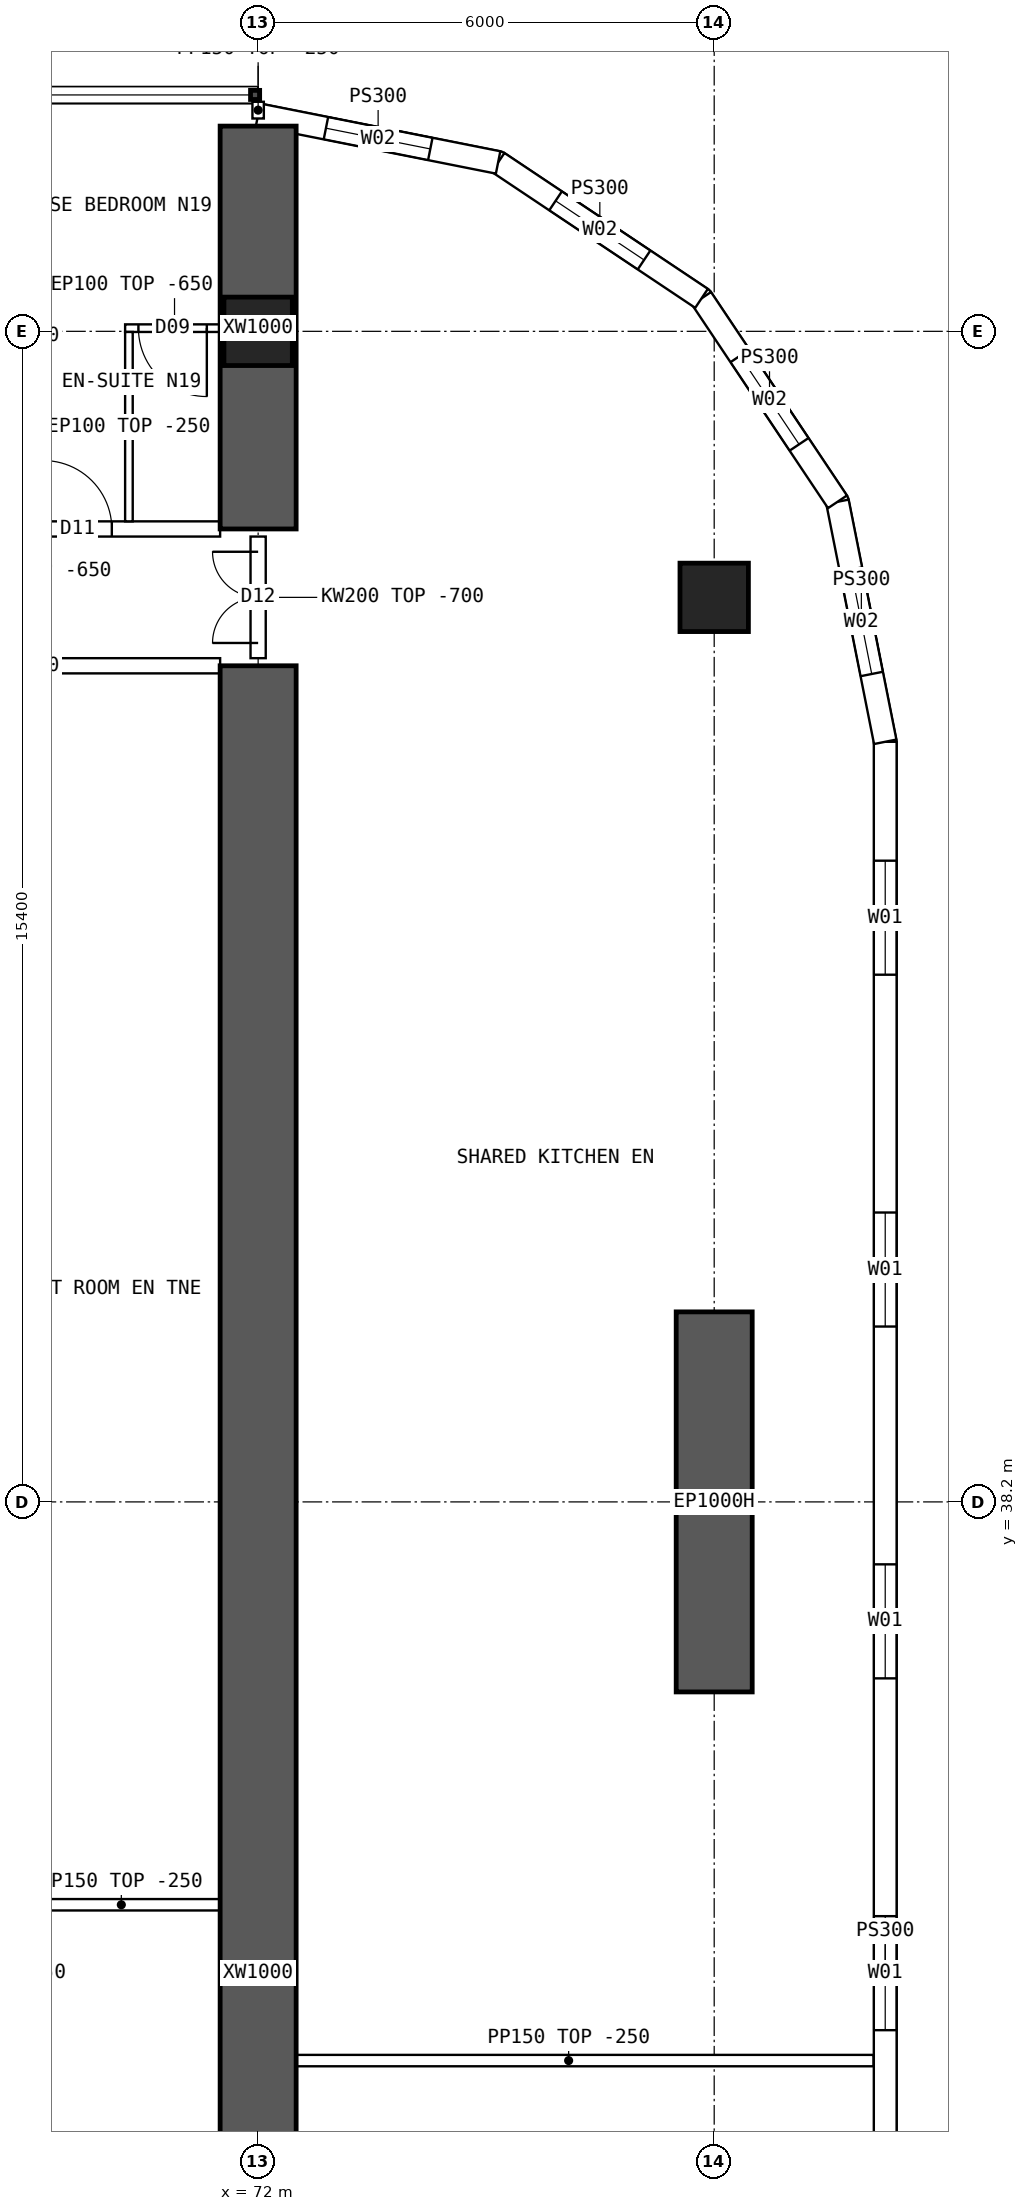
"""IFC4 building model, lengths in metres.
Left out: names, types, materials, properties, quantities, classifications, styles, units other than length and angle.
Written with IfcOpenShell. Run it as: python <this file> out.ifc"""

import sys

from ifc_helpers import new_model, si_unit, direction, frame, frame_2d, origin, origin_2d, place, context, subcontext, project, spatial, polyline, rectangle, hollow_rectangle, outline, extrude, element, fill, save


model = new_model("IFC4")
c1 = context("Model", 3, precision=1e-05, world=origin(), true_north=direction((0.0, 1.0)))
c2 = subcontext(c1, "Body", "Model", "MODEL_VIEW")
j1 = project(units=[si_unit("LENGTHUNIT", "METRE"), si_unit("PLANEANGLEUNIT", "RADIAN")], contexts=[c1])
p1 = place(None, origin())
s1 = spatial("IfcSite", under=j1, at=p1, CompositionType="ELEMENT")
p2 = place(p1, origin())
s2 = spatial("IfcBuilding", under=s1, at=p2, CompositionType="ELEMENT")
p3 = place(p2, frame((0.0, 0.0, 61.45)))
s3 = spatial("IfcBuildingStorey", under=s2, at=p3, CompositionType="ELEMENT", Elevation=61.45)
for number, where, z_axis, x_axis in (
    (1, (72.0, 53.6, 0.0), (0.0, 0.0, 1.0), (1.0, 0.0, 0.0)),
    (2, (78.0, 50.1, 0.0), (0.0, 0.0, 1.0), (1.0, 0.0, 0.0)),
):
    element("IfcColumn", number, at=place(p3, frame(where, z_axis=z_axis, x_axis=x_axis)), inside=s3, PredefinedType="COLUMN", context=c2, shape_type="SweptSolid", body=[
        extrude(hollow_rectangle(XDim=0.9, YDim=0.9, WallThickness=0.09, at=origin_2d()), origin(), (0.0, 0.0, 1.0), 3.75),
    ])
p4 = place(p3, frame((78.0, 35.7, 0.0), z_axis=(0.0, 0.0, 1.0), x_axis=(0.0, 1.0, 0.0)))
e3 = element("IfcWall", 3, at=p4, inside=s3, PredefinedType="SHEAR", context=c2, shape_type="SweptSolid", body=[
    extrude(rectangle(XDim=5.0, YDim=1.0, at=frame_2d((2.5, 0.0))), origin(), (0.0, 0.0, 1.0), 3.75),
])
p5 = place(p3, frame((72.0, 51.0, 0.0), z_axis=(0.0, 0.0, 1.0), x_axis=(0.0, 1.0, 0.0)))
e4 = element("IfcWall", 4, at=p5, inside=s3, PredefinedType="SHEAR", context=c2, shape_type="SweptSolid", body=[
    extrude(rectangle(XDim=5.3, YDim=1.0, at=frame_2d((2.65, 0.0))), origin(), (0.0, 0.0, 1.0), 3.75),
])
p6 = place(p3, frame((72.0, 14.8, 0.0), z_axis=(0.0, 0.0, 1.0), x_axis=(0.0, 1.0, 0.0)))
e5 = element("IfcWall", 5, at=p6, inside=s3, PredefinedType="SHEAR", context=c2, shape_type="SweptSolid", body=[
    extrude(rectangle(XDim=34.4, YDim=1.0, at=frame_2d((17.2, 0.0))), origin(), (0.0, 0.0, 1.0), 3.75),
])
p7 = place(p3, frame((80.25, 15.8, 0.0), z_axis=(0.0, 0.0, 1.0), x_axis=(0.0, 1.0, 0.0)))
e6 = element("IfcWall", 6, at=p7, inside=s3, PredefinedType="SOLIDWALL", context=c2, shape_type="SweptSolid", body=[
    extrude(outline(polyline([(-0.015, -0.15), (32.415, -0.15), (32.385, 0.15), (0.015, 0.15), (-0.015, -0.15)])), origin(), (0.0, 0.0, 1.0), 3.5),
])
p8 = place(p7, frame((1.564, 0.0, 0.9)))
e7 = element("IfcOpeningElement", 7, at=p8, cuts=e6, PredefinedType="OPENING", context=c2, shape_type="SweptSolid", body=[
    extrude(rectangle(XDim=1.5, YDim=2.0, at=frame_2d((0.75, 1.0))), frame((0.0, 0.16, 0.0), z_axis=(0.0, -1.0, 0.0), x_axis=(1.0, 0.0, 0.0)), (0.0, 0.0, 1.0), 0.32),
])
p9 = place(p7, frame((6.193, 0.0, 0.9)))
e8 = element("IfcOpeningElement", 8, at=p9, cuts=e6, PredefinedType="OPENING", context=c2, shape_type="SweptSolid", body=[
    extrude(rectangle(XDim=1.5, YDim=2.0, at=frame_2d((0.75, 1.0))), frame((0.0, 0.16, 0.0), z_axis=(0.0, -1.0, 0.0), x_axis=(1.0, 0.0, 0.0)), (0.0, 0.0, 1.0), 0.32),
])
p10 = place(p7, frame((10.822, 0.0, 0.9)))
e9 = element("IfcOpeningElement", 9, at=p10, cuts=e6, PredefinedType="OPENING", context=c2, shape_type="SweptSolid", body=[
    extrude(rectangle(XDim=1.5, YDim=2.0, at=frame_2d((0.75, 1.0))), frame((0.0, 0.16, 0.0), z_axis=(0.0, -1.0, 0.0), x_axis=(1.0, 0.0, 0.0)), (0.0, 0.0, 1.0), 0.32),
])
p11 = place(p7, frame((15.45, 0.0, 0.9)))
e10 = element("IfcOpeningElement", 10, at=p11, cuts=e6, PredefinedType="OPENING", context=c2, shape_type="SweptSolid", body=[
    extrude(rectangle(XDim=1.5, YDim=2.0, at=frame_2d((0.75, 1.0))), frame((0.0, 0.16, 0.0), z_axis=(0.0, -1.0, 0.0), x_axis=(1.0, 0.0, 0.0)), (0.0, 0.0, 1.0), 0.32),
])
p12 = place(p7, frame((20.079, 0.0, 0.9)))
e11 = element("IfcOpeningElement", 11, at=p12, cuts=e6, PredefinedType="OPENING", context=c2, shape_type="SweptSolid", body=[
    extrude(rectangle(XDim=1.5, YDim=2.0, at=frame_2d((0.75, 1.0))), frame((0.0, 0.16, 0.0), z_axis=(0.0, -1.0, 0.0), x_axis=(1.0, 0.0, 0.0)), (0.0, 0.0, 1.0), 0.32),
])
p13 = place(p7, frame((24.707, 0.0, 0.9)))
e12 = element("IfcOpeningElement", 12, at=p13, cuts=e6, PredefinedType="OPENING", context=c2, shape_type="SweptSolid", body=[
    extrude(rectangle(XDim=1.5, YDim=2.0, at=frame_2d((0.75, 1.0))), frame((0.0, 0.16, 0.0), z_axis=(0.0, -1.0, 0.0), x_axis=(1.0, 0.0, 0.0)), (0.0, 0.0, 1.0), 0.32),
])
p14 = place(p7, frame((29.336, 0.0, 0.9)))
e13 = element("IfcOpeningElement", 13, at=p14, cuts=e6, PredefinedType="OPENING", context=c2, shape_type="SweptSolid", body=[
    extrude(rectangle(XDim=1.5, YDim=2.0, at=frame_2d((0.75, 1.0))), frame((0.0, 0.16, 0.0), z_axis=(0.0, -1.0, 0.0), x_axis=(1.0, 0.0, 0.0)), (0.0, 0.0, 1.0), 0.32),
])
p15 = place(p3, frame((80.25, 48.2, 0.0), z_axis=(0.0, 0.0, 1.0), x_axis=(-0.195065901187, 0.980790137692, 0.0)))
e14 = element("IfcWall", 14, at=p15, inside=s3, PredefinedType="SOLIDWALL", context=c2, shape_type="SweptSolid", body=[
    extrude(outline(polyline([(-0.015, -0.15), (3.249, -0.15), (3.189, 0.15), (0.015, 0.15), (-0.015, -0.15)])), origin(), (0.0, 0.0, 1.0), 3.5),
])
p16 = place(p15, frame((0.909, 0.0, 0.9)))
e15 = element("IfcOpeningElement", 15, at=p16, cuts=e14, PredefinedType="OPENING", context=c2, shape_type="SweptSolid", body=[
    extrude(rectangle(XDim=1.4, YDim=1.8, at=frame_2d((0.7, 0.9))), frame((0.0, 0.16, 0.0), z_axis=(0.0, -1.0, 0.0), x_axis=(1.0, 0.0, 0.0)), (0.0, 0.0, 1.0), 0.32),
])
p17 = place(p3, frame((79.622, 51.357, 0.0), z_axis=(0.0, 0.0, 1.0), x_axis=(-0.555609954424, 0.831443069936, 0.0)))
e16 = element("IfcWall", 16, at=p17, inside=s3, PredefinedType="SOLIDWALL", context=c2, shape_type="SweptSolid", body=[
    extrude(outline(polyline([(-0.03, -0.15), (3.249, -0.15), (3.189, 0.15), (0.03, 0.15), (-0.03, -0.15)])), origin(), (0.0, 0.0, 1.0), 3.5),
])
p18 = place(p17, frame((0.909, 0.0, 0.9)))
e17 = element("IfcOpeningElement", 17, at=p18, cuts=e16, PredefinedType="OPENING", context=c2, shape_type="SweptSolid", body=[
    extrude(rectangle(XDim=1.4, YDim=1.8, at=frame_2d((0.7, 0.9))), frame((0.0, 0.16, 0.0), z_axis=(0.0, -1.0, 0.0), x_axis=(1.0, 0.0, 0.0)), (0.0, 0.0, 1.0), 0.32),
])
p19 = place(p3, frame((77.833, 54.034, 0.0), z_axis=(0.0, 0.0, 1.0), x_axis=(-0.831478105043, 0.555557522525, 0.0)))
e18 = element("IfcWall", 18, at=p19, inside=s3, PredefinedType="SOLIDWALL", context=c2, shape_type="SweptSolid", body=[
    extrude(outline(polyline([(-0.03, -0.15), (3.249, -0.15), (3.189, 0.15), (0.03, 0.15), (-0.03, -0.15)])), origin(), (0.0, 0.0, 1.0), 3.5),
])
p20 = place(p19, frame((0.909, 0.0, 0.9)))
e19 = element("IfcOpeningElement", 19, at=p20, cuts=e18, PredefinedType="OPENING", context=c2, shape_type="SweptSolid", body=[
    extrude(rectangle(XDim=1.4, YDim=1.8, at=frame_2d((0.7, 0.9))), frame((0.0, 0.16, 0.0), z_axis=(0.0, -1.0, 0.0), x_axis=(1.0, 0.0, 0.0)), (0.0, 0.0, 1.0), 0.32),
])
p21 = place(p3, frame((75.157, 55.822, 0.0), z_axis=(0.0, 0.0, 1.0), x_axis=(-0.980787251524, 0.195080412259, 0.0)))
e20 = element("IfcWall", 20, at=p21, inside=s3, PredefinedType="SOLIDWALL", context=c2, shape_type="SweptSolid", body=[
    extrude(outline(polyline([(-0.03, -0.15), (3.249, -0.15), (3.189, 0.15), (0.03, 0.15), (-0.03, -0.15)])), origin(), (0.0, 0.0, 1.0), 3.5),
])
p22 = place(p21, frame((0.909, 0.0, 0.9)))
e21 = element("IfcOpeningElement", 21, at=p22, cuts=e20, PredefinedType="OPENING", context=c2, shape_type="SweptSolid", body=[
    extrude(rectangle(XDim=1.4, YDim=1.8, at=frame_2d((0.7, 0.9))), frame((0.0, 0.16, 0.0), z_axis=(0.0, -1.0, 0.0), x_axis=(1.0, 0.0, 0.0)), (0.0, 0.0, 1.0), 0.32),
])
p23 = place(p3, frame((66.5, 51.0, 0.0), z_axis=(0.0, 0.0, 1.0), x_axis=(1.0, 0.0, 0.0)))
e22 = element("IfcWall", 22, at=p23, inside=s3, PredefinedType="SOLIDWALL", context=c2, shape_type="SweptSolid", body=[
    extrude(outline(polyline([(0.0, 0.0), (5.0, 0.0), (5.0, 3.1), (0.0, 3.1), (0.0, 0.0)])), frame((0.0, 0.1, 0.0), z_axis=(0.0, -1.0, 0.0), x_axis=(1.0, 0.0, 0.0)), (0.0, 0.0, 1.0), 0.2),
])
p24 = place(p23, frame((1.3, 0.0, 0.0)))
e23 = element("IfcOpeningElement", 23, at=p24, cuts=e22, PredefinedType="OPENING", context=c2, shape_type="SweptSolid", body=[
    extrude(rectangle(XDim=0.9, YDim=2.1, at=frame_2d((0.45, 1.05))), frame((0.0, 0.11, 0.0), z_axis=(0.0, -1.0, 0.0), x_axis=(1.0, 0.0, 0.0)), (0.0, 0.0, 1.0), 0.22),
])
p25 = place(p23, frame((2.675, 0.0, 0.0)))
e24 = element("IfcOpeningElement", 24, at=p25, cuts=e22, PredefinedType="OPENING", context=c2, shape_type="SweptSolid", body=[
    extrude(rectangle(XDim=0.9, YDim=2.1, at=frame_2d((0.45, 1.05))), frame((0.0, 0.11, 0.0), z_axis=(0.0, -1.0, 0.0), x_axis=(1.0, 0.0, 0.0)), (0.0, 0.0, 1.0), 0.22),
])
p26 = place(p3, frame((66.5, 49.2, 0.0), z_axis=(0.0, 0.0, 1.0), x_axis=(1.0, 0.0, 0.0)))
e25 = element("IfcWall", 25, at=p26, inside=s3, PredefinedType="SOLIDWALL", context=c2, shape_type="SweptSolid", body=[
    extrude(rectangle(XDim=5.0, YDim=0.2, at=frame_2d((2.5, 0.0))), origin(), (0.0, 0.0, 1.0), 3.5),
])
p27 = place(p26, frame((0.2, 0.0, 0.0)))
e26 = element("IfcOpeningElement", 26, at=p27, cuts=e25, PredefinedType="OPENING", context=c2, shape_type="SweptSolid", body=[
    extrude(rectangle(XDim=1.6, YDim=2.1, at=frame_2d((0.8, 1.05))), frame((0.0, 0.11, 0.0), z_axis=(0.0, -1.0, 0.0), x_axis=(1.0, 0.0, 0.0)), (0.0, 0.0, 1.0), 0.22),
])
p28 = place(p3, frame((70.25, 53.642, 0.0), z_axis=(0.0, 0.0, 1.0), x_axis=(1.0, 0.0, 0.0)))
e27 = element("IfcWall", 27, at=p28, inside=s3, PredefinedType="PARTITIONING", context=c2, shape_type="SweptSolid", body=[
    extrude(outline(polyline([(0.0, 0.0), (1.3, 0.0), (1.3, 3.1), (0.0, 3.1), (0.0, 0.0)])), frame((0.0, 0.05, 0.0), z_axis=(0.0, -1.0, 0.0), x_axis=(1.0, 0.0, 0.0)), (0.0, 0.0, 1.0), 0.1),
])
p29 = place(p28, frame((0.175, 0.0, 0.0)))
e28 = element("IfcOpeningElement", 28, at=p29, cuts=e27, PredefinedType="OPENING", context=c2, shape_type="SweptSolid", body=[
    extrude(rectangle(XDim=0.9, YDim=2.1, at=frame_2d((0.45, 1.05))), frame((0.0, 0.06, 0.0), z_axis=(0.0, -1.0, 0.0), x_axis=(1.0, 0.0, 0.0)), (0.0, 0.0, 1.0), 0.12),
])
p30 = place(p3, frame((70.3, 53.592, 0.0), z_axis=(0.0, 0.0, 1.0), x_axis=(0.0, -1.0, 0.0)))
e29 = element("IfcWall", 29, at=p30, inside=s3, PredefinedType="PARTITIONING", context=c2, shape_type="SweptSolid", body=[
    extrude(outline(polyline([(0.0, 0.0), (2.492, 0.0), (2.492, 3.1), (2.444, 3.1), (2.442, 3.5), (0.194, 3.5), (0.192, 3.1), (0.0, 3.1), (0.0, 0.0)])), frame((0.0, 0.05, 0.0), z_axis=(0.0, -1.0, 0.0), x_axis=(1.0, 0.0, 0.0)), (0.0, 0.0, 1.0), 0.1),
])
p31 = place(p3, frame((68.4, 32.9, 0.0), z_axis=(0.0, 0.0, 1.0), x_axis=(1.0, 0.0, 0.0)))
e30 = element("IfcWall", 30, at=p31, inside=s3, PredefinedType="PARTITIONING", context=c2, shape_type="SweptSolid", body=[
    extrude(rectangle(XDim=3.6, YDim=0.15, at=frame_2d((1.8, 0.0))), origin(), (0.0, 0.0, 1.0), 3.5),
])
p32 = place(p3, frame((72.075, 30.85, 0.0), z_axis=(0.0, 0.0, 1.0), x_axis=(1.0, 0.0, 0.0)))
e31 = element("IfcWall", 31, at=p32, inside=s3, PredefinedType="PARTITIONING", context=c2, shape_type="SweptSolid", body=[
    extrude(outline(polyline([(0.0, 0.0), (8.02, 0.0), (8.02, 3.5), (6.227, 3.5), (6.225, 3.05), (5.627, 3.05), (5.625, 3.5), (0.0, 3.5), (0.0, 0.0)])), frame((0.0, 0.075, 0.0), z_axis=(0.0, -1.0, 0.0), x_axis=(1.0, 0.0, 0.0)), (0.0, 0.0, 1.0), 0.15),
])
p33 = place(p3, frame((72.0, 49.3, 0.0), z_axis=(0.0, 0.0, 1.0), x_axis=(0.0, 1.0, 0.0)))
e32 = element("IfcWall", 32, at=p33, inside=s3, PredefinedType="SOLIDWALL", context=c2, shape_type="SweptSolid", body=[
    extrude(outline(polyline([(0.0, 0.0), (1.6, 0.0), (1.6, 3.05), (0.0, 3.05), (0.0, 0.0)])), frame((0.0, 0.1, 0.0), z_axis=(0.0, -1.0, 0.0), x_axis=(1.0, 0.0, 0.0)), (0.0, 0.0, 1.0), 0.2),
])
p34 = place(p33, frame((0.2, 0.0, 0.0)))
e33 = element("IfcOpeningElement", 33, at=p34, cuts=e32, PredefinedType="OPENING", context=c2, shape_type="SweptSolid", body=[
    extrude(rectangle(XDim=1.2, YDim=2.1, at=frame_2d((0.6, 1.05))), frame((0.0, 0.11, 0.0), z_axis=(0.0, -1.0, 0.0), x_axis=(1.0, 0.0, 0.0)), (0.0, 0.0, 1.0), 0.22),
])
p35 = place(p3, frame((72.0, 56.4, 0.0), z_axis=(0.0, 0.0, 1.0), x_axis=(0.0, 1.0, 0.0)))
e34 = element("IfcWall", 34, at=p35, inside=s3, PredefinedType="PARTITIONING", context=c2, shape_type="SweptSolid", body=[
    extrude(rectangle(XDim=0.22, YDim=0.15, at=frame_2d((0.11, 0.0))), origin(), (0.0, 0.0, 1.0), 3.5),
])
p36 = place(p11, origin())
e35 = element("IfcWindow", 35, at=p36, inside=s3, PartitioningType="SINGLE_PANEL", PredefinedType="WINDOW", context=c2, shape_type="SweptSolid", body=[
    extrude(rectangle(XDim=1.5, YDim=2.0, at=frame_2d((0.75, 1.0))), frame((0.0, 0.03, 0.0), z_axis=(0.0, -1.0, 0.0), x_axis=(1.0, 0.0, 0.0)), (0.0, 0.0, 1.0), 0.06),
])
fill(e10, e35)
p37 = place(p12, origin())
e36 = element("IfcWindow", 36, at=p37, inside=s3, PartitioningType="SINGLE_PANEL", PredefinedType="WINDOW", context=c2, shape_type="SweptSolid", body=[
    extrude(rectangle(XDim=1.5, YDim=2.0, at=frame_2d((0.75, 1.0))), frame((0.0, 0.03, 0.0), z_axis=(0.0, -1.0, 0.0), x_axis=(1.0, 0.0, 0.0)), (0.0, 0.0, 1.0), 0.06),
])
fill(e11, e36)
p38 = place(p13, origin())
e37 = element("IfcWindow", 37, at=p38, inside=s3, PartitioningType="SINGLE_PANEL", PredefinedType="WINDOW", context=c2, shape_type="SweptSolid", body=[
    extrude(rectangle(XDim=1.5, YDim=2.0, at=frame_2d((0.75, 1.0))), frame((0.0, 0.03, 0.0), z_axis=(0.0, -1.0, 0.0), x_axis=(1.0, 0.0, 0.0)), (0.0, 0.0, 1.0), 0.06),
])
fill(e12, e37)
p39 = place(p14, origin())
e38 = element("IfcWindow", 38, at=p39, inside=s3, PartitioningType="SINGLE_PANEL", PredefinedType="WINDOW", context=c2, shape_type="SweptSolid", body=[
    extrude(rectangle(XDim=1.5, YDim=2.0, at=frame_2d((0.75, 1.0))), frame((0.0, 0.03, 0.0), z_axis=(0.0, -1.0, 0.0), x_axis=(1.0, 0.0, 0.0)), (0.0, 0.0, 1.0), 0.06),
])
fill(e13, e38)
p40 = place(p16, origin())
e39 = element("IfcWindow", 39, at=p40, inside=s3, PartitioningType="SINGLE_PANEL", PredefinedType="WINDOW", context=c2, shape_type="SweptSolid", body=[
    extrude(rectangle(XDim=1.4, YDim=1.8, at=frame_2d((0.7, 0.9))), frame((0.0, 0.03, 0.0), z_axis=(0.0, -1.0, 0.0), x_axis=(1.0, 0.0, 0.0)), (0.0, 0.0, 1.0), 0.06),
])
fill(e15, e39)
p41 = place(p18, origin())
e40 = element("IfcWindow", 40, at=p41, inside=s3, PartitioningType="SINGLE_PANEL", PredefinedType="WINDOW", context=c2, shape_type="SweptSolid", body=[
    extrude(rectangle(XDim=1.4, YDim=1.8, at=frame_2d((0.7, 0.9))), frame((0.0, 0.03, 0.0), z_axis=(0.0, -1.0, 0.0), x_axis=(1.0, 0.0, 0.0)), (0.0, 0.0, 1.0), 0.06),
])
fill(e17, e40)
p42 = place(p20, origin())
e41 = element("IfcWindow", 41, at=p42, inside=s3, PartitioningType="SINGLE_PANEL", PredefinedType="WINDOW", context=c2, shape_type="SweptSolid", body=[
    extrude(rectangle(XDim=1.4, YDim=1.8, at=frame_2d((0.7, 0.9))), frame((0.0, 0.03, 0.0), z_axis=(0.0, -1.0, 0.0), x_axis=(1.0, 0.0, 0.0)), (0.0, 0.0, 1.0), 0.06),
])
fill(e19, e41)
p43 = place(p22, origin())
e42 = element("IfcWindow", 42, at=p43, inside=s3, PartitioningType="SINGLE_PANEL", PredefinedType="WINDOW", context=c2, shape_type="SweptSolid", body=[
    extrude(rectangle(XDim=1.4, YDim=1.8, at=frame_2d((0.7, 0.9))), frame((0.0, 0.03, 0.0), z_axis=(0.0, -1.0, 0.0), x_axis=(1.0, 0.0, 0.0)), (0.0, 0.0, 1.0), 0.06),
])
fill(e21, e42)
p44 = place(p29, origin())
e43 = element("IfcDoor", 43, at=p44, inside=s3, OperationType="SINGLE_SWING_RIGHT", PredefinedType="DOOR", context=c2, shape_type="SweptSolid", body=[
    extrude(rectangle(XDim=0.9, YDim=2.1, at=frame_2d((0.45, 1.05))), frame((0.0, 0.025, 0.0), z_axis=(0.0, -1.0, 0.0), x_axis=(1.0, 0.0, 0.0)), (0.0, 0.0, 1.0), 0.05),
])
fill(e28, e43)
p45 = place(p25, origin())
e44 = element("IfcDoor", 44, at=p45, inside=s3, OperationType="SINGLE_SWING_LEFT", PredefinedType="DOOR", context=c2, shape_type="SweptSolid", body=[
    extrude(rectangle(XDim=0.9, YDim=2.1, at=frame_2d((0.45, 1.05))), frame((0.0, 0.025, 0.0), z_axis=(0.0, -1.0, 0.0), x_axis=(1.0, 0.0, 0.0)), (0.0, 0.0, 1.0), 0.05),
])
fill(e24, e44)
p46 = place(p34, origin())
e45 = element("IfcDoor", 45, at=p46, inside=s3, OperationType="DOUBLE_DOOR_SINGLE_SWING", PredefinedType="DOOR", context=c2, shape_type="SweptSolid", body=[
    extrude(rectangle(XDim=1.2, YDim=2.1, at=frame_2d((0.6, 1.05))), frame((0.0, 0.025, 0.0), z_axis=(0.0, -1.0, 0.0), x_axis=(1.0, 0.0, 0.0)), (0.0, 0.0, 1.0), 0.05),
])
fill(e33, e45)
save(model, sys.argv[1])
